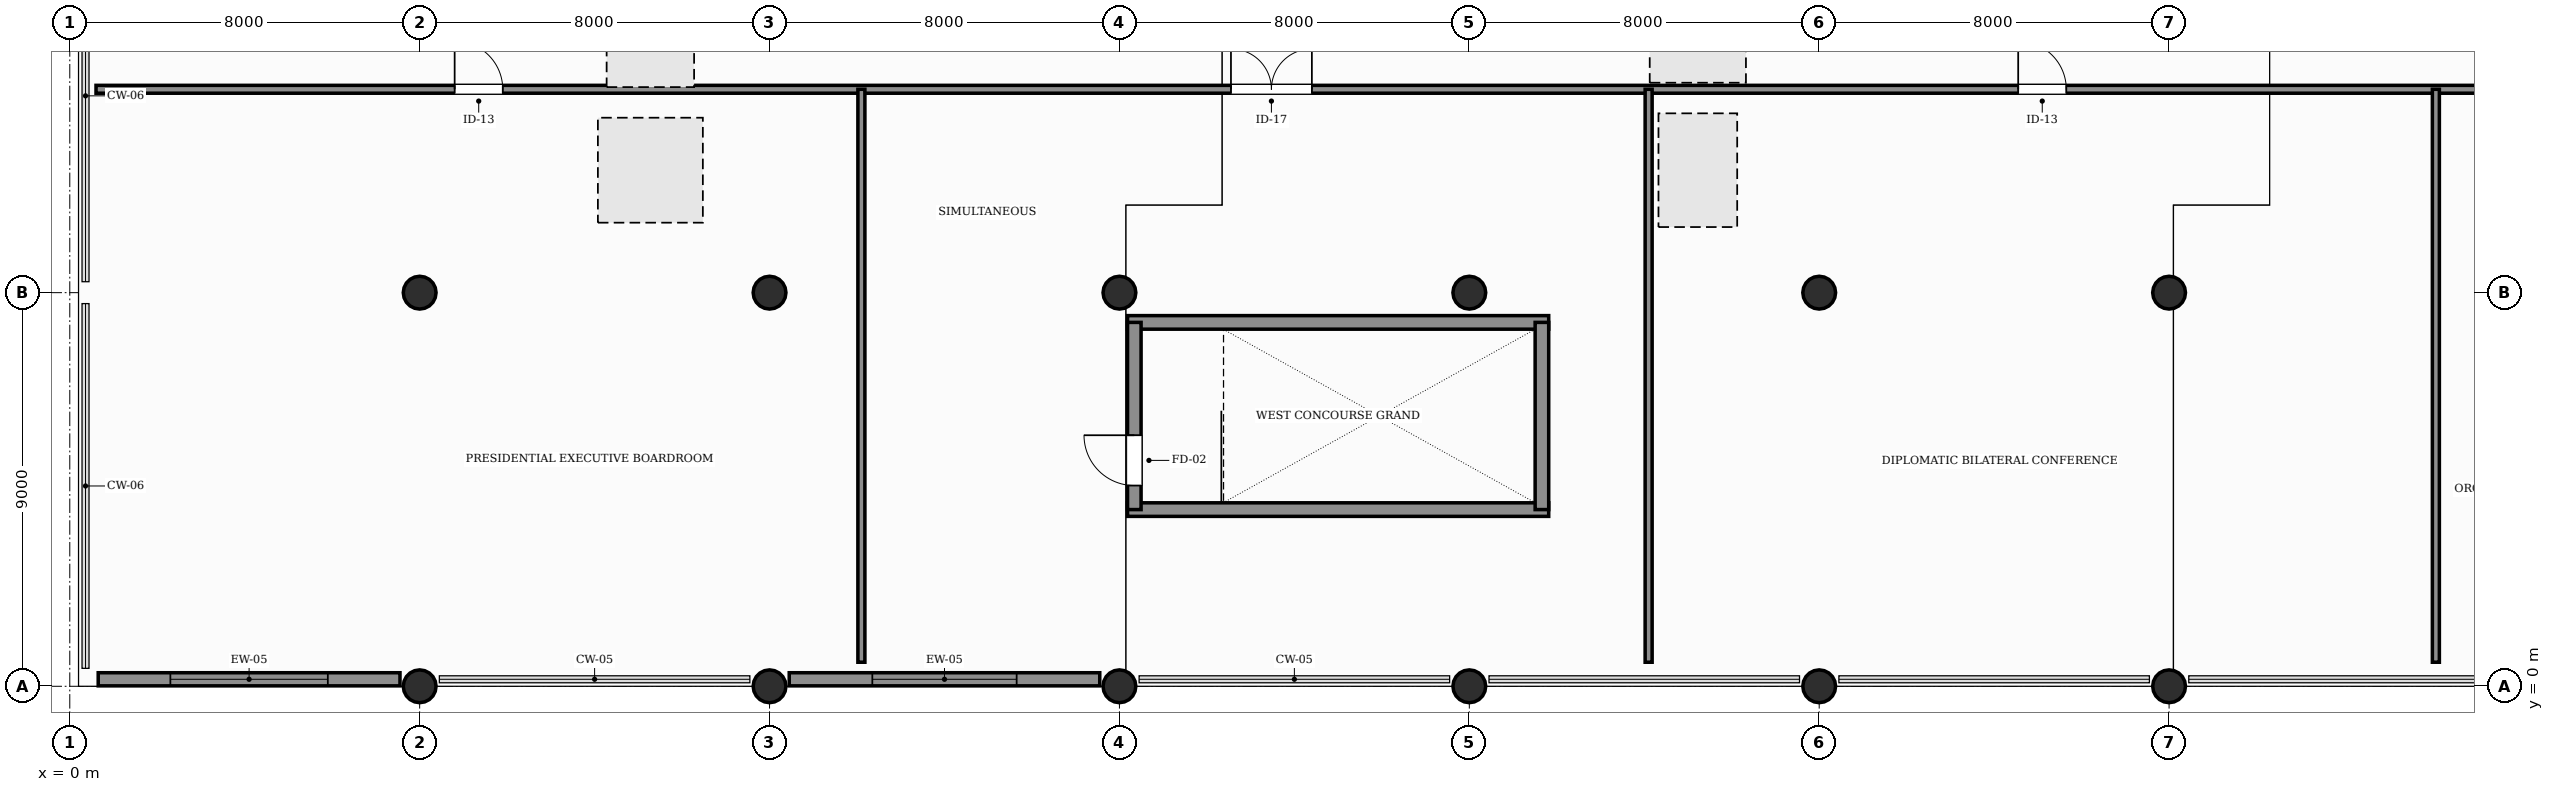
"""IFC4 building model, lengths in metres.
Left out: names, types, materials, properties, quantities, classifications, styles, units other than length and angle.
Written with IfcOpenShell. Run it as: python <this file> out.ifc"""

import sys

from ifc_helpers import new_model, si_unit, direction, frame, frame_2d, origin, origin_2d, place, context, subcontext, project, spatial, rectangle, circle, extrude, element, fill, save


model = new_model("IFC4")
c1 = context("Model", 3, precision=1e-05, world=origin(), true_north=direction((0.0, 1.0)))
c2 = subcontext(c1, "Body", "Model", "MODEL_VIEW")
j1 = project(units=[si_unit("LENGTHUNIT", "METRE"), si_unit("PLANEANGLEUNIT", "RADIAN")], contexts=[c1])
p1 = place(None, origin())
s1 = spatial("IfcSite", under=j1, at=p1, CompositionType="ELEMENT")
p2 = place(p1, origin())
s2 = spatial("IfcBuilding", under=s1, at=p2, CompositionType="ELEMENT")
p3 = place(p2, frame((0.0, 0.0, 21.0)))
s3 = spatial("IfcBuildingStorey", under=s2, at=p3, CompositionType="ELEMENT", Elevation=21.0)
for number, where, z_axis, x_axis in (
    (1, (8.0, 0.0, 0.0), (0.0, 0.0, 1.0), (1.0, 0.0, 0.0)),
    (2, (8.0, 9.0, 0.0), (0.0, 0.0, 1.0), (1.0, 0.0, 0.0)),
    (3, (16.0, 0.0, 0.0), (0.0, 0.0, 1.0), (1.0, 0.0, 0.0)),
    (4, (16.0, 9.0, 0.0), (0.0, 0.0, 1.0), (1.0, 0.0, 0.0)),
    (5, (24.0, 0.0, 0.0), (0.0, 0.0, 1.0), (1.0, 0.0, 0.0)),
    (6, (24.0, 9.0, 0.0), (0.0, 0.0, 1.0), (1.0, 0.0, 0.0)),
    (7, (32.0, 0.0, 0.0), (0.0, 0.0, 1.0), (1.0, 0.0, 0.0)),
    (8, (32.0, 9.0, 0.0), (0.0, 0.0, 1.0), (1.0, 0.0, 0.0)),
    (9, (40.0, 0.0, 0.0), (0.0, 0.0, 1.0), (1.0, 0.0, 0.0)),
    (10, (40.0, 9.0, 0.0), (0.0, 0.0, 1.0), (1.0, 0.0, 0.0)),
    (11, (48.0, 0.0, 0.0), (0.0, 0.0, 1.0), (1.0, 0.0, 0.0)),
    (12, (48.0, 9.0, 0.0), (0.0, 0.0, 1.0), (1.0, 0.0, 0.0)),
):
    element("IfcColumn", number, at=place(p3, frame(where, z_axis=z_axis, x_axis=x_axis)), inside=s3, PredefinedType="COLUMN", context=c2, shape_type="SweptSolid", body=[
        extrude(circle(Radius=0.375, at=origin_2d()), origin(), (0.0, 0.0, 1.0), 4.8),
    ])
p4 = place(p3, frame((0.65, 0.16, 0.0), z_axis=(0.0, 0.0, 1.0), x_axis=(1.0, 0.0, 0.0)))
e13 = element("IfcWall", 13, at=p4, inside=s3, PredefinedType="SOLIDWALL", context=c2, shape_type="SweptSolid", body=[
    extrude(rectangle(XDim=6.9, YDim=0.3, at=frame_2d((3.45, 0.0))), origin(), (0.0, 0.0, 1.0), 3.68),
])
p5 = place(p4, frame((1.65, 0.0, 0.9)))
e14 = element("IfcOpeningElement", 14, at=p5, cuts=e13, PredefinedType="OPENING", context=c2, shape_type="SweptSolid", body=[
    extrude(rectangle(XDim=3.6, YDim=1.95, at=frame_2d((1.8, 0.975))), frame((0.0, 0.16, 0.0), z_axis=(0.0, -1.0, 0.0), x_axis=(1.0, 0.0, 0.0)), (0.0, 0.0, 1.0), 0.32),
])
p6 = place(p3, frame((16.45, 0.16, 0.0), z_axis=(0.0, 0.0, 1.0), x_axis=(1.0, 0.0, 0.0)))
e15 = element("IfcWall", 15, at=p6, inside=s3, PredefinedType="SOLIDWALL", context=c2, shape_type="SweptSolid", body=[
    extrude(rectangle(XDim=7.1, YDim=0.3, at=frame_2d((3.55, 0.0))), origin(), (0.0, 0.0, 1.0), 3.68),
])
p7 = place(p6, frame((1.9, 0.0, 0.9)))
e16 = element("IfcOpeningElement", 16, at=p7, cuts=e15, PredefinedType="OPENING", context=c2, shape_type="SweptSolid", body=[
    extrude(rectangle(XDim=3.3, YDim=1.9, at=frame_2d((1.65, 0.95))), frame((0.0, 0.16, 0.0), z_axis=(0.0, -1.0, 0.0), x_axis=(1.0, 0.0, 0.0)), (0.0, 0.0, 1.0), 0.32),
])
for number, where, z_axis, x_axis in (
    (17, (24.185, 4.04, 0.0), (0.0, 0.0, 1.0), (1.0, 0.0, 0.0)),
    (18, (24.185, 8.32, 0.0), (0.0, 0.0, 1.0), (1.0, 0.0, 0.0)),
):
    element("IfcWall", number, at=place(p3, frame(where, z_axis=z_axis, x_axis=x_axis)), inside=s3, PredefinedType="SHEAR", context=c2, shape_type="SweptSolid", body=[
        extrude(rectangle(XDim=9.63, YDim=0.31, at=frame_2d((4.815, 0.0))), origin(), (0.0, 0.0, 1.0), 4.8),
    ])
p8 = place(p3, frame((24.34, 4.04, 0.0), z_axis=(0.0, 0.0, 1.0), x_axis=(0.0, 1.0, 0.0)))
e19 = element("IfcWall", 19, at=p8, inside=s3, PredefinedType="SHEAR", context=c2, shape_type="SweptSolid", body=[
    extrude(rectangle(XDim=4.28, YDim=0.31, at=frame_2d((2.14, 0.0))), origin(), (0.0, 0.0, 1.0), 4.8),
])
p9 = place(p8, frame((0.55, 0.0, 0.0)))
e20 = element("IfcOpeningElement", 20, at=p9, cuts=e19, PredefinedType="OPENING", context=c2, shape_type="SweptSolid", body=[
    extrude(rectangle(XDim=1.15, YDim=2.2, at=frame_2d((0.575, 1.1))), frame((0.0, 0.165, 0.0), z_axis=(0.0, -1.0, 0.0), x_axis=(1.0, 0.0, 0.0)), (0.0, 0.0, 1.0), 0.33),
])
p10 = place(p3, frame((33.66, 4.04, 0.0), z_axis=(0.0, 0.0, 1.0), x_axis=(0.0, 1.0, 0.0)))
e21 = element("IfcWall", 21, at=p10, inside=s3, PredefinedType="SHEAR", context=c2, shape_type="SweptSolid", body=[
    extrude(rectangle(XDim=4.28, YDim=0.31, at=frame_2d((2.14, 0.0))), origin(), (0.0, 0.0, 1.0), 4.8),
])
p11 = place(p3, frame((0.6, 13.65, 0.0), z_axis=(0.0, 0.0, 1.0), x_axis=(1.0, 0.0, 0.0)))
e22 = element("IfcWall", 22, at=p11, inside=s3, PredefinedType="PARTITIONING", context=c2, shape_type="SweptSolid", body=[
    extrude(rectangle(XDim=94.9, YDim=0.18, at=frame_2d((47.45, 0.0))), origin(), (0.0, 0.0, 1.0), 3.6),
])
p12 = place(p11, frame((8.2, 0.0, 0.0)))
e23 = element("IfcOpeningElement", 23, at=p12, cuts=e22, PredefinedType="OPENING", context=c2, shape_type="SweptSolid", body=[
    extrude(rectangle(XDim=1.1, YDim=2.45, at=frame_2d((0.55, 1.225))), frame((0.0, 0.1, 0.0), z_axis=(0.0, -1.0, 0.0), x_axis=(1.0, 0.0, 0.0)), (0.0, 0.0, 1.0), 0.2),
])
p13 = place(p11, frame((25.95, 0.0, 0.0)))
e24 = element("IfcOpeningElement", 24, at=p13, cuts=e22, PredefinedType="OPENING", context=c2, shape_type="SweptSolid", body=[
    extrude(rectangle(XDim=1.85, YDim=2.45, at=frame_2d((0.925, 1.225))), frame((0.0, 0.1, 0.0), z_axis=(0.0, -1.0, 0.0), x_axis=(1.0, 0.0, 0.0)), (0.0, 0.0, 1.0), 0.2),
])
p14 = place(p11, frame((43.95, 0.0, 0.0)))
e25 = element("IfcOpeningElement", 25, at=p14, cuts=e22, PredefinedType="OPENING", context=c2, shape_type="SweptSolid", body=[
    extrude(rectangle(XDim=1.1, YDim=2.45, at=frame_2d((0.55, 1.225))), frame((0.0, 0.1, 0.0), z_axis=(0.0, -1.0, 0.0), x_axis=(1.0, 0.0, 0.0)), (0.0, 0.0, 1.0), 0.2),
])
p15 = place(p11, frame((61.95, 0.0, 0.0)))
e26 = element("IfcOpeningElement", 26, at=p15, cuts=e22, PredefinedType="OPENING", context=c2, shape_type="SweptSolid", body=[
    extrude(rectangle(XDim=1.85, YDim=2.45, at=frame_2d((0.925, 1.225))), frame((0.0, 0.1, 0.0), z_axis=(0.0, -1.0, 0.0), x_axis=(1.0, 0.0, 0.0)), (0.0, 0.0, 1.0), 0.2),
])
p16 = place(p11, frame((82.65, 0.0, 0.0)))
e27 = element("IfcOpeningElement", 27, at=p16, cuts=e22, PredefinedType="OPENING", context=c2, shape_type="SweptSolid", body=[
    extrude(rectangle(XDim=1.1, YDim=2.45, at=frame_2d((0.55, 1.225))), frame((0.0, 0.1, 0.0), z_axis=(0.0, -1.0, 0.0), x_axis=(1.0, 0.0, 0.0)), (0.0, 0.0, 1.0), 0.2),
])
for number, where, z_axis, x_axis in (
    (28, (18.1, 0.55, 0.0), (0.0, 0.0, 1.0), (0.0, 1.0, 0.0)),
    (29, (36.1, 0.55, 0.0), (0.0, 0.0, 1.0), (0.0, 1.0, 0.0)),
    (30, (54.1, 0.55, 0.0), (0.0, 0.0, 1.0), (0.0, 1.0, 0.0)),
):
    element("IfcWall", number, at=place(p3, frame(where, z_axis=z_axis, x_axis=x_axis)), inside=s3, PredefinedType="PARTITIONING", context=c2, shape_type="SweptSolid", body=[
        extrude(rectangle(XDim=13.1, YDim=0.16, at=frame_2d((6.55, 0.0))), origin(), (0.0, 0.0, 1.0), 3.6),
    ])
p17 = place(p5, origin())
e31 = element("IfcWindow", 31, at=p17, inside=s3, PartitioningType="SINGLE_PANEL", PredefinedType="WINDOW", context=c2, shape_type="SweptSolid", body=[
    extrude(rectangle(XDim=3.6, YDim=1.95, at=frame_2d((1.8, 0.975))), frame((0.0, 0.03, 0.0), z_axis=(0.0, -1.0, 0.0), x_axis=(1.0, 0.0, 0.0)), (0.0, 0.0, 1.0), 0.06),
])
fill(e14, e31)
p18 = place(p7, origin())
e32 = element("IfcWindow", 32, at=p18, inside=s3, PartitioningType="SINGLE_PANEL", PredefinedType="WINDOW", context=c2, shape_type="SweptSolid", body=[
    extrude(rectangle(XDim=3.3, YDim=1.9, at=frame_2d((1.65, 0.95))), frame((0.0, 0.03, 0.0), z_axis=(0.0, -1.0, 0.0), x_axis=(1.0, 0.0, 0.0)), (0.0, 0.0, 1.0), 0.06),
])
fill(e16, e32)
p19 = place(p2, frame((0.0, 0.0, 25.8)))
p20 = place(p19, frame((0.0, 0.0, -0.16)))
p21 = place(p20, frame((13.275, 11.8, 0.0)))
p22 = place(p21, frame((0.0, 0.0, 0.11)))
e33 = element("IfcWindow", 33, at=p22, inside=s3, PartitioningType="SINGLE_PANEL", PredefinedType="SKYLIGHT", context=c2, shape_type="SweptSolid", body=[
    extrude(rectangle(XDim=2.4, YDim=2.4, at=origin_2d()), origin(), (0.0, 0.0, 1.0), 0.05),
])
p23 = place(p20, frame((13.275, 15.2, 0.0)))
p24 = place(p23, frame((0.0, 0.0, 0.11)))
e34 = element("IfcWindow", 34, at=p24, inside=s3, PartitioningType="SINGLE_PANEL", PredefinedType="SKYLIGHT", context=c2, shape_type="SweptSolid", body=[
    extrude(rectangle(XDim=2.0, YDim=3.0, at=origin_2d()), origin(), (0.0, 0.0, 1.0), 0.05),
])
p25 = place(p19, frame((0.0, 0.0, -0.16)))
p26 = place(p25, frame((37.225, 11.8, 0.0)))
p27 = place(p26, frame((0.0, 0.0, 0.11)))
e35 = element("IfcWindow", 35, at=p27, inside=s3, PartitioningType="SINGLE_PANEL", PredefinedType="SKYLIGHT", context=c2, shape_type="SweptSolid", body=[
    extrude(rectangle(XDim=1.8, YDim=2.6, at=origin_2d()), origin(), (0.0, 0.0, 1.0), 0.05),
])
p28 = place(p25, frame((37.225, 15.2, 0.0)))
p29 = place(p28, frame((0.0, 0.0, 0.11)))
e36 = element("IfcWindow", 36, at=p29, inside=s3, PartitioningType="SINGLE_PANEL", PredefinedType="SKYLIGHT", context=c2, shape_type="SweptSolid", body=[
    extrude(rectangle(XDim=2.2, YDim=2.8, at=origin_2d()), origin(), (0.0, 0.0, 1.0), 0.05),
])
p30 = place(p9, origin())
e37 = element("IfcDoor", 37, at=p30, inside=s3, OperationType="SINGLE_SWING_RIGHT", PredefinedType="DOOR", context=c2, shape_type="SweptSolid", body=[
    extrude(rectangle(XDim=1.15, YDim=2.2, at=frame_2d((0.575, 1.1))), frame((0.0, 0.025, 0.0), z_axis=(0.0, -1.0, 0.0), x_axis=(1.0, 0.0, 0.0)), (0.0, 0.0, 1.0), 0.05),
])
fill(e20, e37)
p31 = place(p12, origin())
e38 = element("IfcDoor", 38, at=p31, inside=s3, OperationType="SINGLE_SWING_LEFT", PredefinedType="DOOR", context=c2, shape_type="SweptSolid", body=[
    extrude(rectangle(XDim=1.1, YDim=2.45, at=frame_2d((0.55, 1.225))), frame((0.0, 0.025, 0.0), z_axis=(0.0, -1.0, 0.0), x_axis=(1.0, 0.0, 0.0)), (0.0, 0.0, 1.0), 0.05),
])
fill(e23, e38)
p32 = place(p13, origin())
e39 = element("IfcDoor", 39, at=p32, inside=s3, OperationType="DOUBLE_DOOR_SINGLE_SWING", PredefinedType="DOOR", context=c2, shape_type="SweptSolid", body=[
    extrude(rectangle(XDim=1.85, YDim=2.45, at=frame_2d((0.925, 1.225))), frame((0.0, 0.025, 0.0), z_axis=(0.0, -1.0, 0.0), x_axis=(1.0, 0.0, 0.0)), (0.0, 0.0, 1.0), 0.05),
])
fill(e24, e39)
p33 = place(p14, origin())
e40 = element("IfcDoor", 40, at=p33, inside=s3, OperationType="SINGLE_SWING_LEFT", PredefinedType="DOOR", context=c2, shape_type="SweptSolid", body=[
    extrude(rectangle(XDim=1.1, YDim=2.45, at=frame_2d((0.55, 1.225))), frame((0.0, 0.025, 0.0), z_axis=(0.0, -1.0, 0.0), x_axis=(1.0, 0.0, 0.0)), (0.0, 0.0, 1.0), 0.05),
])
fill(e25, e40)
save(model, sys.argv[1])
